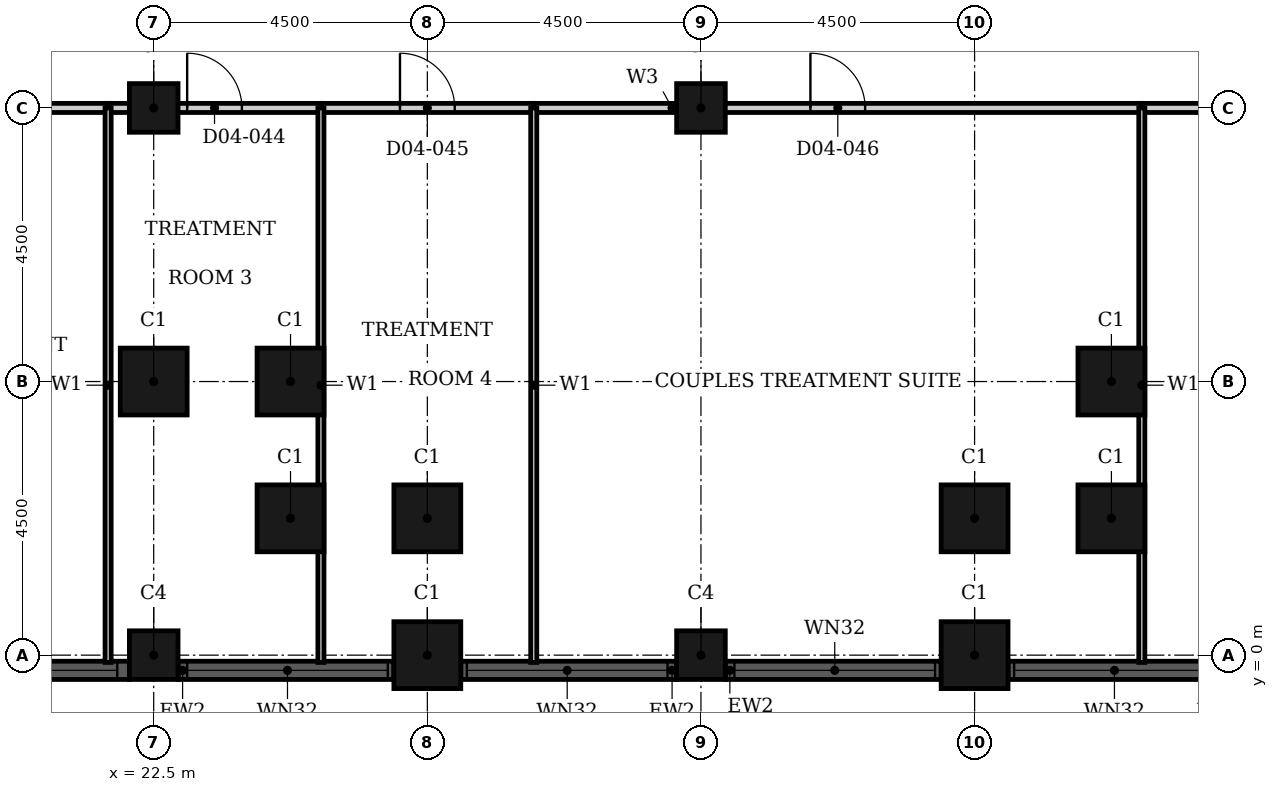
"""IFC4 building model, lengths in metres.
Left out: names, types, materials, properties, quantities, classifications, styles, units other than length and angle.
Written with IfcOpenShell. Run it as: python <this file> out.ifc"""

import sys

from ifc_helpers import new_model, si_unit, direction, frame, frame_2d, origin, origin_2d, place, context, subcontext, project, spatial, rectangle, hollow_rectangle, extrude, element, fill, save


model = new_model("IFC4")
c1 = context("Model", 3, precision=1e-05, world=origin(), true_north=direction((0.0, 1.0)))
c2 = subcontext(c1, "Body", "Model", "MODEL_VIEW")
j1 = project(units=[si_unit("LENGTHUNIT", "METRE"), si_unit("PLANEANGLEUNIT", "RADIAN")], contexts=[c1])
p1 = place(None, origin())
s1 = spatial("IfcSite", under=j1, at=p1, CompositionType="ELEMENT")
p2 = place(p1, origin())
s2 = spatial("IfcBuilding", under=s1, at=p2, CompositionType="ELEMENT")
p3 = place(p2, frame((0.0, 0.0, 24.0)))
s3 = spatial("IfcBuildingStorey", under=s2, at=p3, CompositionType="ELEMENT", Elevation=24.0)
for number, where, z_axis, x_axis in (
    (1, (22.5, 4.5, 0.0), (0.0, 0.0, 1.0), (1.0, 0.0, 0.0)),
    (2, (24.75, 4.5, 0.0), (0.0, 0.0, 1.0), (1.0, 0.0, 0.0)),
    (3, (24.75, 2.25, 0.0), (0.0, 0.0, 1.0), (1.0, 0.0, 0.0)),
    (4, (27.0, 2.25, 0.0), (0.0, 0.0, 1.0), (1.0, 0.0, 0.0)),
    (5, (27.0, 0.0, 0.0), (0.0, 0.0, 1.0), (1.0, 0.0, 0.0)),
    (6, (36.0, 0.0, 0.0), (0.0, 0.0, 1.0), (1.0, 0.0, 0.0)),
    (7, (36.0, 2.25, 0.0), (0.0, 0.0, 1.0), (1.0, 0.0, 0.0)),
    (8, (38.25, 2.25, 0.0), (0.0, 0.0, 1.0), (1.0, 0.0, 0.0)),
    (9, (38.25, 4.5, 0.0), (0.0, 0.0, 1.0), (1.0, 0.0, 0.0)),
):
    element("IfcColumn", number, at=place(p3, frame(where, z_axis=z_axis, x_axis=x_axis)), inside=s3, PredefinedType="COLUMN", context=c2, shape_type="SweptSolid", body=[
        extrude(hollow_rectangle(XDim=1.1, YDim=1.1, WallThickness=0.036, at=origin_2d()), origin(), (0.0, 0.0, 1.0), 4.8),
    ])
for number, where, z_axis, x_axis in (
    (10, (22.5, 0.0, 0.0), (0.0, 0.0, 1.0), (1.0, 0.0, 0.0)),
    (11, (31.5, 0.0, 0.0), (0.0, 0.0, 1.0), (1.0, 0.0, 0.0)),
    (12, (22.5, 9.0, 0.0), (0.0, 0.0, 1.0), (1.0, 0.0, 0.0)),
    (13, (31.5, 9.0, 0.0), (0.0, 0.0, 1.0), (1.0, 0.0, 0.0)),
):
    element("IfcColumn", number, at=place(p3, frame(where, z_axis=z_axis, x_axis=x_axis)), inside=s3, PredefinedType="COLUMN", context=c2, shape_type="SweptSolid", body=[
        extrude(hollow_rectangle(XDim=0.8, YDim=0.8, WallThickness=0.025, at=origin_2d()), origin(), (0.0, 0.0, 1.0), 4.8),
    ])
p4 = place(p3, frame((13.9, -0.25, 0.0), z_axis=(0.0, 0.0, 1.0), x_axis=(1.0, 0.0, 0.0)))
e14 = element("IfcWall", 14, at=p4, inside=s3, PredefinedType="SOLIDWALL", context=c2, shape_type="SweptSolid", body=[
    extrude(rectangle(XDim=8.2, YDim=0.3, at=frame_2d((4.1, 0.0))), origin(), (0.0, 0.0, 1.0), 4.8),
])
p5 = place(p4, frame((0.2, 0.0, 0.9)))
e15 = element("IfcOpeningElement", 15, at=p5, cuts=e14, PredefinedType="OPENING", context=c2, shape_type="SweptSolid", body=[
    extrude(rectangle(XDim=3.3, YDim=2.9, at=frame_2d((1.65, 1.45))), frame((0.0, 0.16, 0.0), z_axis=(0.0, -1.0, 0.0), x_axis=(1.0, 0.0, 0.0)), (0.0, 0.0, 1.0), 0.32),
])
p6 = place(p4, frame((4.7, 0.0, 0.9)))
e16 = element("IfcOpeningElement", 16, at=p6, cuts=e14, PredefinedType="OPENING", context=c2, shape_type="SweptSolid", body=[
    extrude(rectangle(XDim=3.3, YDim=2.9, at=frame_2d((1.65, 1.45))), frame((0.0, 0.16, 0.0), z_axis=(0.0, -1.0, 0.0), x_axis=(1.0, 0.0, 0.0)), (0.0, 0.0, 1.0), 0.32),
])
p7 = place(p3, frame((22.9, -0.25, 0.0), z_axis=(0.0, 0.0, 1.0), x_axis=(1.0, 0.0, 0.0)))
e17 = element("IfcWall", 17, at=p7, inside=s3, PredefinedType="SOLIDWALL", context=c2, shape_type="SweptSolid", body=[
    extrude(rectangle(XDim=3.55, YDim=0.3, at=frame_2d((1.775, 0.0))), origin(), (0.0, 0.0, 1.0), 4.8),
])
p8 = place(p7, frame((0.15, 0.0, 0.9)))
e18 = element("IfcOpeningElement", 18, at=p8, cuts=e17, PredefinedType="OPENING", context=c2, shape_type="SweptSolid", body=[
    extrude(rectangle(XDim=3.3, YDim=2.9, at=frame_2d((1.65, 1.45))), frame((0.0, 0.16, 0.0), z_axis=(0.0, -1.0, 0.0), x_axis=(1.0, 0.0, 0.0)), (0.0, 0.0, 1.0), 0.32),
])
p9 = place(p3, frame((27.55, -0.25, 0.0), z_axis=(0.0, 0.0, 1.0), x_axis=(1.0, 0.0, 0.0)))
e19 = element("IfcWall", 19, at=p9, inside=s3, PredefinedType="SOLIDWALL", context=c2, shape_type="SweptSolid", body=[
    extrude(rectangle(XDim=3.55, YDim=0.3, at=frame_2d((1.775, 0.0))), origin(), (0.0, 0.0, 1.0), 4.8),
])
p10 = place(p9, frame((0.1, 0.0, 0.9)))
e20 = element("IfcOpeningElement", 20, at=p10, cuts=e19, PredefinedType="OPENING", context=c2, shape_type="SweptSolid", body=[
    extrude(rectangle(XDim=3.3, YDim=2.9, at=frame_2d((1.65, 1.45))), frame((0.0, 0.16, 0.0), z_axis=(0.0, -1.0, 0.0), x_axis=(1.0, 0.0, 0.0)), (0.0, 0.0, 1.0), 0.32),
])
p11 = place(p3, frame((31.9, -0.25, 0.0), z_axis=(0.0, 0.0, 1.0), x_axis=(1.0, 0.0, 0.0)))
e21 = element("IfcWall", 21, at=p11, inside=s3, PredefinedType="SOLIDWALL", context=c2, shape_type="SweptSolid", body=[
    extrude(rectangle(XDim=3.55, YDim=0.3, at=frame_2d((1.775, 0.0))), origin(), (0.0, 0.0, 1.0), 4.8),
])
p12 = place(p11, frame((0.15, 0.0, 0.9)))
e22 = element("IfcOpeningElement", 22, at=p12, cuts=e21, PredefinedType="OPENING", context=c2, shape_type="SweptSolid", body=[
    extrude(rectangle(XDim=3.3, YDim=2.9, at=frame_2d((1.65, 1.45))), frame((0.0, 0.16, 0.0), z_axis=(0.0, -1.0, 0.0), x_axis=(1.0, 0.0, 0.0)), (0.0, 0.0, 1.0), 0.32),
])
p13 = place(p3, frame((36.55, -0.25, 0.0), z_axis=(0.0, 0.0, 1.0), x_axis=(1.0, 0.0, 0.0)))
e23 = element("IfcWall", 23, at=p13, inside=s3, PredefinedType="SOLIDWALL", context=c2, shape_type="SweptSolid", body=[
    extrude(rectangle(XDim=3.55, YDim=0.3, at=frame_2d((1.775, 0.0))), origin(), (0.0, 0.0, 1.0), 4.8),
])
p14 = place(p13, frame((0.1, 0.0, 0.9)))
e24 = element("IfcOpeningElement", 24, at=p14, cuts=e23, PredefinedType="OPENING", context=c2, shape_type="SweptSolid", body=[
    extrude(rectangle(XDim=3.3, YDim=2.9, at=frame_2d((1.65, 1.45))), frame((0.0, 0.16, 0.0), z_axis=(0.0, -1.0, 0.0), x_axis=(1.0, 0.0, 0.0)), (0.0, 0.0, 1.0), 0.32),
])
p15 = place(p3, frame((18.25, 9.0, 0.0), z_axis=(0.0, 0.0, 1.0), x_axis=(1.0, 0.0, 0.0)))
e25 = element("IfcWall", 25, at=p15, inside=s3, PredefinedType="PARTITIONING", context=c2, shape_type="SweptSolid", body=[
    extrude(rectangle(XDim=3.5, YDim=0.15, at=frame_2d((1.75, 0.0))), origin(), (0.0, 0.0, 1.0), 4.45),
])
p16 = place(p15, frame((1.3, 0.0, 0.0)))
e26 = element("IfcOpeningElement", 26, at=p16, cuts=e25, PredefinedType="OPENING", context=c2, shape_type="SweptSolid", body=[
    extrude(rectangle(XDim=0.9, YDim=2.1, at=frame_2d((0.45, 1.05))), frame((0.0, 0.085, 0.0), z_axis=(0.0, -1.0, 0.0), x_axis=(1.0, 0.0, 0.0)), (0.0, 0.0, 1.0), 0.17),
])
p17 = place(p3, frame((21.75, 9.0, 0.0), z_axis=(0.0, 0.0, 1.0), x_axis=(1.0, 0.0, 0.0)))
e27 = element("IfcWall", 27, at=p17, inside=s3, PredefinedType="PARTITIONING", context=c2, shape_type="SweptSolid", body=[
    extrude(rectangle(XDim=3.5, YDim=0.15, at=frame_2d((1.75, 0.0))), origin(), (0.0, 0.0, 1.0), 4.45),
])
p18 = place(p17, frame((1.3, 0.0, 0.0)))
e28 = element("IfcOpeningElement", 28, at=p18, cuts=e27, PredefinedType="OPENING", context=c2, shape_type="SweptSolid", body=[
    extrude(rectangle(XDim=0.9, YDim=2.1, at=frame_2d((0.45, 1.05))), frame((0.0, 0.085, 0.0), z_axis=(0.0, -1.0, 0.0), x_axis=(1.0, 0.0, 0.0)), (0.0, 0.0, 1.0), 0.17),
])
p19 = place(p3, frame((25.25, 9.0, 0.0), z_axis=(0.0, 0.0, 1.0), x_axis=(1.0, 0.0, 0.0)))
e29 = element("IfcWall", 29, at=p19, inside=s3, PredefinedType="PARTITIONING", context=c2, shape_type="SweptSolid", body=[
    extrude(rectangle(XDim=3.5, YDim=0.15, at=frame_2d((1.75, 0.0))), origin(), (0.0, 0.0, 1.0), 4.45),
])
p20 = place(p19, frame((1.3, 0.0, 0.0)))
e30 = element("IfcOpeningElement", 30, at=p20, cuts=e29, PredefinedType="OPENING", context=c2, shape_type="SweptSolid", body=[
    extrude(rectangle(XDim=0.9, YDim=2.1, at=frame_2d((0.45, 1.05))), frame((0.0, 0.085, 0.0), z_axis=(0.0, -1.0, 0.0), x_axis=(1.0, 0.0, 0.0)), (0.0, 0.0, 1.0), 0.17),
])
p21 = place(p3, frame((28.75, 9.0, 0.0), z_axis=(0.0, 0.0, 1.0), x_axis=(1.0, 0.0, 0.0)))
e31 = element("IfcWall", 31, at=p21, inside=s3, PredefinedType="PARTITIONING", context=c2, shape_type="SweptSolid", body=[
    extrude(rectangle(XDim=10.0, YDim=0.15, at=frame_2d((5.0, 0.0))), origin(), (0.0, 0.0, 1.0), 4.45),
])
p22 = place(p21, frame((4.55, 0.0, 0.0)))
e32 = element("IfcOpeningElement", 32, at=p22, cuts=e31, PredefinedType="OPENING", context=c2, shape_type="SweptSolid", body=[
    extrude(rectangle(XDim=0.9, YDim=2.1, at=frame_2d((0.45, 1.05))), frame((0.0, 0.085, 0.0), z_axis=(0.0, -1.0, 0.0), x_axis=(1.0, 0.0, 0.0)), (0.0, 0.0, 1.0), 0.17),
])
p23 = place(p3, frame((38.75, 9.0, 0.0), z_axis=(0.0, 0.0, 1.0), x_axis=(1.0, 0.0, 0.0)))
e33 = element("IfcWall", 33, at=p23, inside=s3, PredefinedType="PARTITIONING", context=c2, shape_type="SweptSolid", body=[
    extrude(rectangle(XDim=6.75, YDim=0.15, at=frame_2d((3.375, 0.0))), origin(), (0.0, 0.0, 1.0), 4.45),
])
p24 = place(p23, frame((2.925, 0.0, 0.0)))
e34 = element("IfcOpeningElement", 34, at=p24, cuts=e33, PredefinedType="OPENING", context=c2, shape_type="SweptSolid", body=[
    extrude(rectangle(XDim=0.9, YDim=2.1, at=frame_2d((0.45, 1.05))), frame((0.0, 0.085, 0.0), z_axis=(0.0, -1.0, 0.0), x_axis=(1.0, 0.0, 0.0)), (0.0, 0.0, 1.0), 0.17),
])
for number, where, z_axis, x_axis in (
    (35, (21.75, -0.12, 0.0), (0.0, 0.0, 1.0), (0.0, 1.0, 0.0)),
    (36, (25.25, -0.12, 0.0), (0.0, 0.0, 1.0), (0.0, 1.0, 0.0)),
    (37, (28.75, -0.12, 0.0), (0.0, 0.0, 1.0), (0.0, 1.0, 0.0)),
    (38, (38.75, -0.12, 0.0), (0.0, 0.0, 1.0), (0.0, 1.0, 0.0)),
):
    element("IfcWall", number, at=place(p3, frame(where, z_axis=z_axis, x_axis=x_axis)), inside=s3, PredefinedType="PARTITIONING", context=c2, shape_type="SweptSolid", body=[
        extrude(rectangle(XDim=9.12, YDim=0.1, at=frame_2d((4.56, 0.0))), origin(), (0.0, 0.0, 1.0), 4.45),
    ])
p25 = place(p6, origin())
e39 = element("IfcWindow", 39, at=p25, inside=s3, PartitioningType="SINGLE_PANEL", PredefinedType="WINDOW", context=c2, shape_type="SweptSolid", body=[
    extrude(rectangle(XDim=3.3, YDim=2.9, at=frame_2d((1.65, 1.45))), frame((0.0, 0.03, 0.0), z_axis=(0.0, -1.0, 0.0), x_axis=(1.0, 0.0, 0.0)), (0.0, 0.0, 1.0), 0.06),
])
fill(e16, e39)
p26 = place(p8, origin())
e40 = element("IfcWindow", 40, at=p26, inside=s3, PartitioningType="SINGLE_PANEL", PredefinedType="WINDOW", context=c2, shape_type="SweptSolid", body=[
    extrude(rectangle(XDim=3.3, YDim=2.9, at=frame_2d((1.65, 1.45))), frame((0.0, 0.03, 0.0), z_axis=(0.0, -1.0, 0.0), x_axis=(1.0, 0.0, 0.0)), (0.0, 0.0, 1.0), 0.06),
])
fill(e18, e40)
p27 = place(p10, origin())
e41 = element("IfcWindow", 41, at=p27, inside=s3, PartitioningType="SINGLE_PANEL", PredefinedType="WINDOW", context=c2, shape_type="SweptSolid", body=[
    extrude(rectangle(XDim=3.3, YDim=2.9, at=frame_2d((1.65, 1.45))), frame((0.0, 0.03, 0.0), z_axis=(0.0, -1.0, 0.0), x_axis=(1.0, 0.0, 0.0)), (0.0, 0.0, 1.0), 0.06),
])
fill(e20, e41)
p28 = place(p12, origin())
e42 = element("IfcWindow", 42, at=p28, inside=s3, PartitioningType="SINGLE_PANEL", PredefinedType="WINDOW", context=c2, shape_type="SweptSolid", body=[
    extrude(rectangle(XDim=3.3, YDim=2.9, at=frame_2d((1.65, 1.45))), frame((0.0, 0.03, 0.0), z_axis=(0.0, -1.0, 0.0), x_axis=(1.0, 0.0, 0.0)), (0.0, 0.0, 1.0), 0.06),
])
fill(e22, e42)
p29 = place(p14, origin())
e43 = element("IfcWindow", 43, at=p29, inside=s3, PartitioningType="SINGLE_PANEL", PredefinedType="WINDOW", context=c2, shape_type="SweptSolid", body=[
    extrude(rectangle(XDim=3.3, YDim=2.9, at=frame_2d((1.65, 1.45))), frame((0.0, 0.03, 0.0), z_axis=(0.0, -1.0, 0.0), x_axis=(1.0, 0.0, 0.0)), (0.0, 0.0, 1.0), 0.06),
])
fill(e24, e43)
p30 = place(p18, origin())
e44 = element("IfcDoor", 44, at=p30, inside=s3, OperationType="SINGLE_SWING_RIGHT", PredefinedType="DOOR", context=c2, shape_type="SweptSolid", body=[
    extrude(rectangle(XDim=0.9, YDim=2.1, at=frame_2d((0.45, 1.05))), frame((0.0, 0.025, 0.0), z_axis=(0.0, -1.0, 0.0), x_axis=(1.0, 0.0, 0.0)), (0.0, 0.0, 1.0), 0.05),
])
fill(e28, e44)
p31 = place(p20, origin())
e45 = element("IfcDoor", 45, at=p31, inside=s3, OperationType="SINGLE_SWING_RIGHT", PredefinedType="DOOR", context=c2, shape_type="SweptSolid", body=[
    extrude(rectangle(XDim=0.9, YDim=2.1, at=frame_2d((0.45, 1.05))), frame((0.0, 0.025, 0.0), z_axis=(0.0, -1.0, 0.0), x_axis=(1.0, 0.0, 0.0)), (0.0, 0.0, 1.0), 0.05),
])
fill(e30, e45)
p32 = place(p22, origin())
e46 = element("IfcDoor", 46, at=p32, inside=s3, OperationType="SINGLE_SWING_RIGHT", PredefinedType="DOOR", context=c2, shape_type="SweptSolid", body=[
    extrude(rectangle(XDim=0.9, YDim=2.1, at=frame_2d((0.45, 1.05))), frame((0.0, 0.025, 0.0), z_axis=(0.0, -1.0, 0.0), x_axis=(1.0, 0.0, 0.0)), (0.0, 0.0, 1.0), 0.05),
])
fill(e32, e46)
save(model, sys.argv[1])
